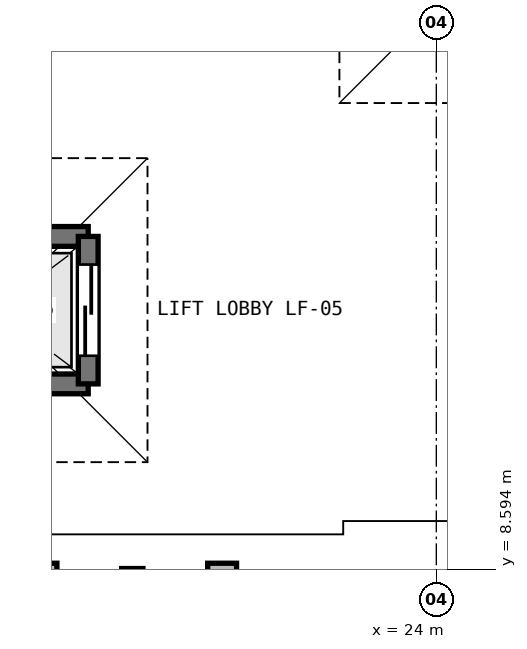
"""IFC4 building model, lengths in metres.
Left out: names, types, materials, properties, quantities, classifications, styles, units other than length and angle.
Written with IfcOpenShell. Run it as: python <this file> out.ifc"""

import sys

from ifc_helpers import new_model, si_unit, direction, frame, frame_2d, origin, place, context, subcontext, project, spatial, rectangle, extrude, element, fill, save


model = new_model("IFC4")
c1 = context("Model", 3, precision=1e-05, world=origin(), true_north=direction((0.0, 1.0)))
c2 = subcontext(c1, "Body", "Model", "MODEL_VIEW")
j1 = project(units=[si_unit("LENGTHUNIT", "METRE"), si_unit("PLANEANGLEUNIT", "RADIAN")], contexts=[c1])
p1 = place(None, origin())
s1 = spatial("IfcSite", under=j1, at=p1, CompositionType="ELEMENT")
p2 = place(p1, origin())
s2 = spatial("IfcBuilding", under=s1, at=p2, CompositionType="ELEMENT")
p3 = place(p2, frame((0.0, 0.0, 5.4)))
s3 = spatial("IfcBuildingStorey", under=s2, at=p3, CompositionType="ELEMENT", Elevation=5.4)
for number, where, z_axis, x_axis in (
    (1, (21.182, 8.67, 0.0), (0.0, 0.0, 1.0), (0.0, -1.0, 0.0)),
    (2, (18.818, 8.67, 0.0), (0.0, 0.0, 1.0), (0.0, -1.0, 0.0)),
):
    element("IfcWall", number, at=place(p3, frame(where, z_axis=z_axis, x_axis=x_axis)), inside=s3, PredefinedType="SOLIDWALL", context=c2, shape_type="SweptSolid", body=[
        extrude(rectangle(XDim=0.6, YDim=0.38, at=frame_2d((0.3, 0.0))), origin(), (0.0, 0.0, 1.0), 3.6),
    ])
for number, where, z_axis, x_axis in (
    (3, (16.98, 12.97, 0.0), (0.0, 0.0, 1.0), (1.0, 0.0, 0.0)),
    (4, (19.42, 11.03, 0.0), (0.0, 0.0, 1.0), (-1.0, 0.0, 0.0)),
):
    element("IfcWall", number, at=place(p3, frame(where, z_axis=z_axis, x_axis=x_axis)), inside=s3, PredefinedType="SHEAR", context=c2, shape_type="SweptSolid", body=[
        extrude(rectangle(XDim=2.44, YDim=0.26, at=frame_2d((1.22, 0.0))), origin(), (0.0, 0.0, 1.0), 4.48),
    ])
p4 = place(p3, frame((19.42, 12.97, 0.0), z_axis=(0.0, 0.0, 1.0), x_axis=(0.0, -1.0, 0.0)))
e5 = element("IfcWall", 5, at=p4, inside=s3, PredefinedType="SHEAR", context=c2, shape_type="SweptSolid", body=[
    extrude(rectangle(XDim=1.94, YDim=0.26, at=frame_2d((0.97, 0.0))), origin(), (0.0, 0.0, 1.0), 4.48),
])
p5 = place(p4, frame((0.37, 0.0, 0.0)))
e6 = element("IfcOpeningElement", 6, at=p5, cuts=e5, PredefinedType="OPENING", context=c2, shape_type="SweptSolid", body=[
    extrude(rectangle(XDim=1.2, YDim=2.15, at=frame_2d((0.6, 1.075))), frame((0.0, 0.14, 0.0), z_axis=(0.0, -1.0, 0.0), x_axis=(1.0, 0.0, 0.0)), (0.0, 0.0, 1.0), 0.28),
])
p6 = place(p5, origin())
e7 = element("IfcDoor", 7, at=p6, inside=s3, OperationType="SLIDING_TO_LEFT", PredefinedType="DOOR", context=c2, shape_type="SweptSolid", body=[
    extrude(rectangle(XDim=1.2, YDim=2.15, at=frame_2d((0.6, 1.075))), frame((0.0, 0.025, 0.0), z_axis=(0.0, -1.0, 0.0), x_axis=(1.0, 0.0, 0.0)), (0.0, 0.0, 1.0), 0.05),
])
fill(e6, e7)
save(model, sys.argv[1])
